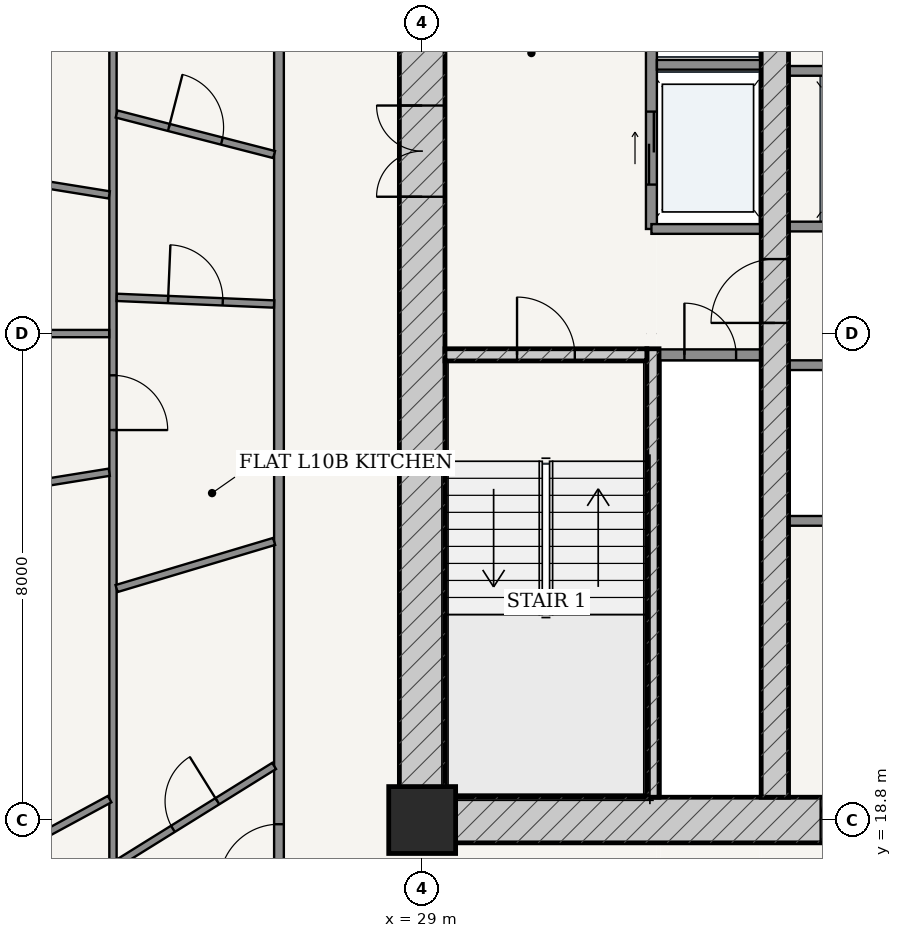
"""IFC4 building model, lengths in metres.
Left out: names, types, materials, properties, quantities, classifications, styles, units other than length and angle.
Written with IfcOpenShell. Run it as: python <this file> out.ifc"""

import sys

from ifc_helpers import new_model, si_unit, direction, frame, frame_2d, origin, origin_2d, place, context, subcontext, project, spatial, rectangle, extrude, source, transform, mapped, element, fill, save


model = new_model("IFC4")
c1 = context("Model", 3, precision=1e-05, world=origin(), true_north=direction((-0.2419218956, 0.970295726276)))
c2 = subcontext(c1, "Body", "Model", "MODEL_VIEW")
j1 = project(units=[si_unit("LENGTHUNIT", "METRE"), si_unit("PLANEANGLEUNIT", "RADIAN")], contexts=[c1])
p1 = place(None, origin())
s1 = spatial("IfcSite", under=j1, at=p1, CompositionType="ELEMENT")
p2 = place(p1, origin())
s2 = spatial("IfcBuilding", under=s1, at=p2, CompositionType="ELEMENT")
p3 = place(p2, frame((0.0, 0.0, 42.0)))
s3 = spatial("IfcBuildingStorey", under=s2, at=p3, CompositionType="ELEMENT", Elevation=42.0)
p4 = place(p3, frame((29.0, 18.8, 0.0), z_axis=(0.0, 0.0, 1.0), x_axis=(1.0, 0.0, 0.0)))
e1 = element("IfcColumn", 1, at=p4, inside=s3, PredefinedType="COLUMN", context=c2, shape_type="SweptSolid", body=[
    extrude(rectangle(XDim=1.1, YDim=1.1, at=origin_2d()), origin(), (0.0, 0.0, 1.0), 3.6),
])
p5 = place(p3, frame((28.625, 18.8, 0.0), z_axis=(0.0, 0.0, 1.0), x_axis=(1.0, 0.0, 0.0)))
e2 = element("IfcWall", 2, at=p5, inside=s3, PredefinedType="SHEAR", context=c2, shape_type="SweptSolid", body=[
    extrude(rectangle(XDim=18.75, YDim=0.75, at=frame_2d((9.375, 0.0))), origin(), (0.0, 0.0, 1.0), 3.32),
])
p6 = place(p5, frame((6.927, 0.0, 0.0)))
e3 = element("IfcOpeningElement", 3, at=p6, cuts=e2, PredefinedType="OPENING", context=c2, shape_type="SweptSolid", body=[
    extrude(rectangle(XDim=0.85, YDim=2.1, at=frame_2d((0.425, 1.05))), frame((0.0, 0.385, 0.0), z_axis=(0.0, -1.0, 0.0), x_axis=(1.0, 0.0, 0.0)), (0.0, 0.0, 1.0), 0.77),
])
p7 = place(p5, frame((8.95, 0.0, 0.0)))
e4 = element("IfcOpeningElement", 4, at=p7, cuts=e2, PredefinedType="OPENING", context=c2, shape_type="SweptSolid", body=[
    extrude(rectangle(XDim=0.85, YDim=2.1, at=frame_2d((0.425, 1.05))), frame((0.0, 0.385, 0.0), z_axis=(0.0, -1.0, 0.0), x_axis=(1.0, 0.0, 0.0)), (0.0, 0.0, 1.0), 0.77),
])
p8 = place(p5, frame((10.972, 0.0, 0.0)))
e5 = element("IfcOpeningElement", 5, at=p8, cuts=e2, PredefinedType="OPENING", context=c2, shape_type="SweptSolid", body=[
    extrude(rectangle(XDim=0.85, YDim=2.1, at=frame_2d((0.425, 1.05))), frame((0.0, 0.385, 0.0), z_axis=(0.0, -1.0, 0.0), x_axis=(1.0, 0.0, 0.0)), (0.0, 0.0, 1.0), 0.77),
])
p9 = place(p3, frame((29.0, 19.175, 0.0), z_axis=(0.0, 0.0, 1.0), x_axis=(0.0, 1.0, 0.0)))
e6 = element("IfcWall", 6, at=p9, inside=s3, PredefinedType="SHEAR", context=c2, shape_type="SweptSolid", body=[
    extrude(rectangle(XDim=15.25, YDim=0.75, at=frame_2d((7.625, 0.0))), origin(), (0.0, 0.0, 1.0), 3.32),
])
p10 = place(p9, frame((9.875, 0.0, 0.0)))
e7 = element("IfcOpeningElement", 7, at=p10, cuts=e6, PredefinedType="OPENING", context=c2, shape_type="SweptSolid", body=[
    extrude(rectangle(XDim=1.5, YDim=2.2, at=frame_2d((0.75, 1.1))), frame((0.0, 0.385, 0.0), z_axis=(0.0, -1.0, 0.0), x_axis=(1.0, 0.0, 0.0)), (0.0, 0.0, 1.0), 0.77),
])
p11 = place(p3, frame((32.795, 19.175, 0.0), z_axis=(0.0, 0.0, 1.0), x_axis=(0.0, 1.0, 0.0)))
e8 = element("IfcWall", 8, at=p11, inside=s3, PredefinedType="SOLIDWALL", context=c2, shape_type="SweptSolid", body=[
    extrude(rectangle(XDim=7.375, YDim=0.2, at=frame_2d((3.688, 0.0))), origin(), (0.0, 0.0, 1.0), 3.32),
])
p12 = place(p3, frame((29.375, 26.45, 0.0), z_axis=(0.0, 0.0, 1.0), x_axis=(1.0, 0.0, 0.0)))
e9 = element("IfcWall", 9, at=p12, inside=s3, PredefinedType="SOLIDWALL", context=c2, shape_type="SweptSolid", body=[
    extrude(rectangle(XDim=3.32, YDim=0.2, at=frame_2d((1.66, 0.0))), origin(), (0.0, 0.0, 1.0), 3.32),
])
p13 = place(p12, frame((1.185, 0.0, 0.0)))
e10 = element("IfcOpeningElement", 10, at=p13, cuts=e9, PredefinedType="OPENING", context=c2, shape_type="SweptSolid", body=[
    extrude(rectangle(XDim=0.95, YDim=2.15, at=frame_2d((0.475, 1.075))), frame((0.0, 0.11, 0.0), z_axis=(0.0, -1.0, 0.0), x_axis=(1.0, 0.0, 0.0)), (0.0, 0.0, 1.0), 0.22),
])
p14 = place(p3, frame((34.8, 19.175, 0.0), z_axis=(0.0, 0.0, 1.0), x_axis=(0.0, 1.0, 0.0)))
e11 = element("IfcWall", 11, at=p14, inside=s3, PredefinedType="SHEAR", context=c2, shape_type="SweptSolid", body=[
    extrude(rectangle(XDim=15.25, YDim=0.45, at=frame_2d((7.625, 0.0))), origin(), (0.0, 0.0, 1.0), 3.32),
])
p15 = place(p14, frame((7.8, 0.0, 0.0)))
e12 = element("IfcOpeningElement", 12, at=p15, cuts=e11, PredefinedType="OPENING", context=c2, shape_type="SweptSolid", body=[
    extrude(rectangle(XDim=1.05, YDim=2.15, at=frame_2d((0.525, 1.075))), frame((0.0, 0.235, 0.0), z_axis=(0.0, -1.0, 0.0), x_axis=(1.0, 0.0, 0.0)), (0.0, 0.0, 1.0), 0.47),
])
p16 = place(p3, frame((32.9, 26.45, 0.0), z_axis=(0.0, 0.0, 1.0), x_axis=(1.0, 0.0, 0.0)))
e13 = element("IfcWall", 13, at=p16, inside=s3, PredefinedType="PARTITIONING", context=c2, shape_type="SweptSolid", body=[
    extrude(rectangle(XDim=1.675, YDim=0.18, at=frame_2d((0.837, 0.0))), origin(), (0.0, 0.0, 1.0), 3.32),
])
p17 = place(p16, frame((0.413, 0.0, 0.0)))
e14 = element("IfcOpeningElement", 14, at=p17, cuts=e13, PredefinedType="OPENING", context=c2, shape_type="SweptSolid", body=[
    extrude(rectangle(XDim=0.85, YDim=2.1, at=frame_2d((0.425, 1.05))), frame((0.0, 0.1, 0.0), z_axis=(0.0, -1.0, 0.0), x_axis=(1.0, 0.0, 0.0)), (0.0, 0.0, 1.0), 0.2),
])
p18 = place(p3, frame((32.77, 28.52, 0.0), z_axis=(0.0, 0.0, 1.0), x_axis=(0.0, 1.0, 0.0)))
e15 = element("IfcWall", 15, at=p18, inside=s3, PredefinedType="PARTITIONING", context=c2, shape_type="SweptSolid", body=[
    extrude(rectangle(XDim=5.905, YDim=0.18, at=frame_2d((2.953, 0.0))), origin(), (0.0, 0.0, 1.0), 3.32),
])
p19 = place(p18, frame((3.655, 0.0, 0.0)))
e16 = element("IfcOpeningElement", 16, at=p19, cuts=e15, PredefinedType="OPENING", context=c2, shape_type="SweptSolid", body=[
    extrude(rectangle(XDim=1.15, YDim=2.2, at=frame_2d((0.575, 1.1))), frame((0.0, 0.1, 0.0), z_axis=(0.0, -1.0, 0.0), x_axis=(1.0, 0.0, 0.0)), (0.0, 0.0, 1.0), 0.2),
])
p20 = place(p18, frame((0.73, 0.0, 0.0)))
e17 = element("IfcOpeningElement", 17, at=p20, cuts=e15, PredefinedType="OPENING", context=c2, shape_type="SweptSolid", body=[
    extrude(rectangle(XDim=1.2, YDim=2.25, at=frame_2d((0.6, 1.125))), frame((0.0, 0.1, 0.0), z_axis=(0.0, -1.0, 0.0), x_axis=(1.0, 0.0, 0.0)), (0.0, 0.0, 1.0), 0.2),
])
p21 = place(p3, frame((32.86, 31.22, 0.0), z_axis=(0.0, 0.0, 1.0), x_axis=(1.0, 0.0, 0.0)))
e18 = element("IfcWall", 18, at=p21, inside=s3, PredefinedType="PARTITIONING", context=c2, shape_type="SweptSolid", body=[
    extrude(rectangle(XDim=1.715, YDim=0.16, at=frame_2d((0.857, 0.0))), origin(), (0.0, 0.0, 1.0), 3.32),
])
p22 = place(p3, frame((32.77, 28.52, 0.0), z_axis=(0.0, 0.0, 1.0), x_axis=(1.0, 0.0, 0.0)))
e19 = element("IfcWall", 19, at=p22, inside=s3, PredefinedType="PARTITIONING", context=c2, shape_type="SweptSolid", body=[
    extrude(rectangle(XDim=1.805, YDim=0.16, at=frame_2d((0.902, 0.0))), origin(), (0.0, 0.0, 1.0), 3.32),
])
p23 = place(p3, frame((35.025, 28.56, 0.0), z_axis=(0.0, 0.0, 1.0), x_axis=(1.0, 0.0, 0.0)))
e20 = element("IfcWall", 20, at=p23, inside=s3, PredefinedType="PARTITIONING", context=c2, shape_type="SweptSolid", body=[
    extrude(rectangle(XDim=5.95, YDim=0.16, at=frame_2d((2.975, 0.0))), origin(), (0.0, 0.0, 1.0), 3.32),
])
p24 = place(p23, frame((0.76, 0.0, 0.0)))
e21 = element("IfcOpeningElement", 21, at=p24, cuts=e20, PredefinedType="OPENING", context=c2, shape_type="SweptSolid", body=[
    extrude(rectangle(XDim=1.1, YDim=2.2, at=frame_2d((0.55, 1.1))), frame((0.0, 0.09, 0.0), z_axis=(0.0, -1.0, 0.0), x_axis=(1.0, 0.0, 0.0)), (0.0, 0.0, 1.0), 0.18),
])
p25 = place(p23, frame((2.425, 0.0, 0.0)))
e22 = element("IfcOpeningElement", 22, at=p25, cuts=e20, PredefinedType="OPENING", context=c2, shape_type="SweptSolid", body=[
    extrude(rectangle(XDim=1.1, YDim=2.2, at=frame_2d((0.55, 1.1))), frame((0.0, 0.09, 0.0), z_axis=(0.0, -1.0, 0.0), x_axis=(1.0, 0.0, 0.0)), (0.0, 0.0, 1.0), 0.18),
])
p26 = place(p23, frame((4.09, 0.0, 0.0)))
e23 = element("IfcOpeningElement", 23, at=p26, cuts=e20, PredefinedType="OPENING", context=c2, shape_type="SweptSolid", body=[
    extrude(rectangle(XDim=1.1, YDim=2.2, at=frame_2d((0.55, 1.1))), frame((0.0, 0.09, 0.0), z_axis=(0.0, -1.0, 0.0), x_axis=(1.0, 0.0, 0.0)), (0.0, 0.0, 1.0), 0.18),
])
for number, where, z_axis, x_axis in (
    (24, (35.025, 31.12, 0.0), (0.0, 0.0, 1.0), (1.0, 0.0, 0.0)),
    (25, (35.025, 26.28, 0.0), (0.0, 0.0, 1.0), (1.0, 0.0, 0.0)),
    (26, (35.025, 23.72, 0.0), (0.0, 0.0, 1.0), (1.0, 0.0, 0.0)),
):
    element("IfcWall", number, at=place(p3, frame(where, z_axis=z_axis, x_axis=x_axis)), inside=s3, PredefinedType="PARTITIONING", context=c2, shape_type="SweptSolid", body=[
        extrude(rectangle(XDim=5.95, YDim=0.16, at=frame_2d((2.975, 0.0))), origin(), (0.0, 0.0, 1.0), 3.32),
    ])
p27 = place(p3, frame((26.645, 16.525, 0.0), z_axis=(0.0, 0.0, 1.0), x_axis=(0.0, 1.0, 0.0)))
e27 = element("IfcWall", 27, at=p27, inside=s3, PredefinedType="PARTITIONING", context=c2, shape_type="SweptSolid", body=[
    extrude(rectangle(XDim=20.55, YDim=0.16, at=frame_2d((10.275, 0.0))), origin(), (0.0, 0.0, 1.0), 2.688),
])
p28 = place(p27, frame((1.226, 0.0, 0.0)))
e28 = element("IfcOpeningElement", 28, at=p28, cuts=e27, PredefinedType="OPENING", context=c2, shape_type="SweptSolid", body=[
    extrude(rectangle(XDim=0.98, YDim=2.2, at=frame_2d((0.49, 1.1))), frame((0.0, 0.09, 0.0), z_axis=(0.0, -1.0, 0.0), x_axis=(1.0, 0.0, 0.0)), (0.0, 0.0, 1.0), 0.18),
])
p29 = place(p3, frame((23.915, 13.715, 0.0), z_axis=(0.0, 0.0, 1.0), x_axis=(0.0, 1.0, 0.0)))
e29 = element("IfcWall", 29, at=p29, inside=s3, PredefinedType="PARTITIONING", context=c2, shape_type="SweptSolid", body=[
    extrude(rectangle(XDim=26.17, YDim=0.12, at=frame_2d((13.085, 0.0))), origin(), (0.0, 0.0, 1.0), 2.688),
])
p30 = place(p29, frame((1.895, 0.0, 0.0)))
e30 = element("IfcOpeningElement", 30, at=p30, cuts=e29, PredefinedType="OPENING", context=c2, shape_type="SweptSolid", body=[
    extrude(rectangle(XDim=0.9, YDim=2.15, at=frame_2d((0.45, 1.075))), frame((0.0, 0.07, 0.0), z_axis=(0.0, -1.0, 0.0), x_axis=(1.0, 0.0, 0.0)), (0.0, 0.0, 1.0), 0.14),
])
p31 = place(p29, frame((11.498, 0.0, 0.0)))
e31 = element("IfcOpeningElement", 31, at=p31, cuts=e29, PredefinedType="OPENING", context=c2, shape_type="SweptSolid", body=[
    extrude(rectangle(XDim=0.9, YDim=2.15, at=frame_2d((0.45, 1.075))), frame((0.0, 0.07, 0.0), z_axis=(0.0, -1.0, 0.0), x_axis=(1.0, 0.0, 0.0)), (0.0, 0.0, 1.0), 0.14),
])
p32 = place(p29, frame((23.831, 0.0, 0.0)))
e32 = element("IfcOpeningElement", 32, at=p32, cuts=e29, PredefinedType="OPENING", context=c2, shape_type="SweptSolid", body=[
    extrude(rectangle(XDim=0.86, YDim=2.15, at=frame_2d((0.43, 1.075))), frame((0.0, 0.07, 0.0), z_axis=(0.0, -1.0, 0.0), x_axis=(1.0, 0.0, 0.0)), (0.0, 0.0, 1.0), 0.14),
])
p33 = place(p3, frame((23.854, 29.08, 0.0), z_axis=(0.0, 0.0, 1.0), x_axis=(-0.987255773689, 0.159141563768, 0.0)))
e33 = element("IfcWall", 33, at=p33, inside=s3, PredefinedType="PARTITIONING", context=c2, shape_type="SweptSolid", body=[
    extrude(rectangle(XDim=14.359, YDim=0.12, at=frame_2d((7.18, 0.0))), origin(), (0.0, 0.0, 1.0), 2.688),
])
p34 = place(p33, frame((5.66, 0.0, 0.0)))
e34 = element("IfcOpeningElement", 34, at=p34, cuts=e33, PredefinedType="OPENING", context=c2, shape_type="SweptSolid", body=[
    extrude(rectangle(XDim=0.9, YDim=2.15, at=frame_2d((0.45, 1.075))), frame((0.0, 0.07, 0.0), z_axis=(0.0, -1.0, 0.0), x_axis=(1.0, 0.0, 0.0)), (0.0, 0.0, 1.0), 0.14),
])
p35 = place(p3, frame((23.853, 26.8, 0.0), z_axis=(0.0, 0.0, 1.0), x_axis=(-1.0, 0.0, 0.0)))
e35 = element("IfcWall", 35, at=p35, inside=s3, PredefinedType="PARTITIONING", context=c2, shape_type="SweptSolid", body=[
    extrude(rectangle(XDim=14.793, YDim=0.12, at=frame_2d((7.396, 0.0))), origin(), (0.0, 0.0, 1.0), 2.762),
])
p36 = place(p35, frame((6.947, 0.0, 0.0)))
e36 = element("IfcOpeningElement", 36, at=p36, cuts=e35, PredefinedType="OPENING", context=c2, shape_type="SweptSolid", body=[
    extrude(rectangle(XDim=0.9, YDim=2.15, at=frame_2d((0.45, 1.075))), frame((0.0, 0.07, 0.0), z_axis=(0.0, -1.0, 0.0), x_axis=(1.0, 0.0, 0.0)), (0.0, 0.0, 1.0), 0.14),
])
p37 = place(p3, frame((23.854, 24.52, 0.0), z_axis=(0.0, 0.0, 1.0), x_axis=(-0.987258444847, -0.159124991997, 0.0)))
e37 = element("IfcWall", 37, at=p37, inside=s3, PredefinedType="PARTITIONING", context=c2, shape_type="SweptSolid", body=[
    extrude(rectangle(XDim=14.359, YDim=0.12, at=frame_2d((7.18, 0.0))), origin(), (0.0, 0.0, 1.0), 2.688),
])
p38 = place(p37, frame((5.659, 0.0, 0.0)))
e38 = element("IfcOpeningElement", 38, at=p38, cuts=e37, PredefinedType="OPENING", context=c2, shape_type="SweptSolid", body=[
    extrude(rectangle(XDim=0.9, YDim=2.15, at=frame_2d((0.45, 1.075))), frame((0.0, 0.07, 0.0), z_axis=(0.0, -1.0, 0.0), x_axis=(1.0, 0.0, 0.0)), (0.0, 0.0, 1.0), 0.14),
])
p39 = place(p3, frame((23.861, 19.144, 0.0), z_axis=(0.0, 0.0, 1.0), x_axis=(-0.879372452045, -0.476134529922, 0.0)))
e39 = element("IfcWall", 39, at=p39, inside=s3, PredefinedType="PARTITIONING", context=c2, shape_type="SweptSolid", body=[
    extrude(rectangle(XDim=11.219, YDim=0.12, at=frame_2d((5.61, 0.0))), origin(), (0.0, 0.0, 1.0), 2.688),
])
p40 = place(p39, frame((4.097, 0.0, 0.0)))
e40 = element("IfcOpeningElement", 40, at=p40, cuts=e39, PredefinedType="OPENING", context=c2, shape_type="SweptSolid", body=[
    extrude(rectangle(XDim=0.9, YDim=2.15, at=frame_2d((0.45, 1.075))), frame((0.0, 0.07, 0.0), z_axis=(0.0, -1.0, 0.0), x_axis=(1.0, 0.0, 0.0)), (0.0, 0.0, 1.0), 0.14),
])
p41 = place(p3, frame((26.565, 29.744, 0.0), z_axis=(0.0, 0.0, 1.0), x_axis=(-0.968421803088, 0.249317490972, 0.0)))
e41 = element("IfcWall", 41, at=p41, inside=s3, PredefinedType="PARTITIONING", context=c2, shape_type="SweptSolid", body=[
    extrude(rectangle(XDim=2.674, YDim=0.12, at=frame_2d((1.337, 0.0))), origin(), (0.0, 0.0, 1.0), 3.32),
])
p42 = place(p41, frame((0.887, 0.0, 0.0)))
e42 = element("IfcOpeningElement", 42, at=p42, cuts=e41, PredefinedType="OPENING", context=c2, shape_type="SweptSolid", body=[
    extrude(rectangle(XDim=0.9, YDim=2.15, at=frame_2d((0.45, 1.075))), frame((0.0, 0.07, 0.0), z_axis=(0.0, -1.0, 0.0), x_axis=(1.0, 0.0, 0.0)), (0.0, 0.0, 1.0), 0.14),
])
p43 = place(p3, frame((26.565, 27.286, 0.0), z_axis=(0.0, 0.0, 1.0), x_axis=(-0.999100094808, 0.042414626666, 0.0)))
e43 = element("IfcWall", 43, at=p43, inside=s3, PredefinedType="PARTITIONING", context=c2, shape_type="SweptSolid", body=[
    extrude(rectangle(XDim=2.59, YDim=0.12, at=frame_2d((1.295, 0.0))), origin(), (0.0, 0.0, 1.0), 3.32),
])
p44 = place(p43, frame((0.845, 0.0, 0.0)))
e44 = element("IfcOpeningElement", 44, at=p44, cuts=e43, PredefinedType="OPENING", context=c2, shape_type="SweptSolid", body=[
    extrude(rectangle(XDim=0.9, YDim=2.15, at=frame_2d((0.45, 1.075))), frame((0.0, 0.07, 0.0), z_axis=(0.0, -1.0, 0.0), x_axis=(1.0, 0.0, 0.0)), (0.0, 0.0, 1.0), 0.14),
])
p45 = place(p3, frame((26.565, 23.382, 0.0), z_axis=(0.0, 0.0, 1.0), x_axis=(-0.958081868855, -0.286494559408, 0.0)))
e45 = element("IfcWall", 45, at=p45, inside=s3, PredefinedType="PARTITIONING", context=c2, shape_type="SweptSolid", body=[
    extrude(rectangle(XDim=2.704, YDim=0.12, at=frame_2d((1.352, 0.0))), origin(), (0.0, 0.0, 1.0), 3.32),
])
p46 = place(p3, frame((26.565, 19.69, 0.0), z_axis=(0.0, 0.0, 1.0), x_axis=(-0.849229217796, -0.52802437031, 0.0)))
e46 = element("IfcWall", 46, at=p46, inside=s3, PredefinedType="PARTITIONING", context=c2, shape_type="SweptSolid", body=[
    extrude(rectangle(XDim=3.059, YDim=0.12, at=frame_2d((1.529, 0.0))), origin(), (0.0, 0.0, 1.0), 3.32),
])
p47 = place(p46, frame((1.099, 0.0, 0.0)))
e47 = element("IfcOpeningElement", 47, at=p47, cuts=e46, PredefinedType="OPENING", context=c2, shape_type="SweptSolid", body=[
    extrude(rectangle(XDim=0.86, YDim=2.15, at=frame_2d((0.43, 1.075))), frame((0.0, 0.07, 0.0), z_axis=(0.0, -1.0, 0.0), x_axis=(1.0, 0.0, 0.0)), (0.0, 0.0, 1.0), 0.14),
])
m1 = source(origin(), c2, "Body", "SweptSolid", [
    extrude(rectangle(XDim=1.5, YDim=2.2, at=frame_2d((0.75, 1.1))), frame((0.0, 0.025, 0.0), z_axis=(0.0, -1.0, 0.0), x_axis=(1.0, 0.0, 0.0)), (0.0, 0.0, 1.0), 0.05),
])
p48 = place(p10, origin())
e48 = element("IfcDoor", 48, at=p48, inside=s3, OperationType="DOUBLE_DOOR_SINGLE_SWING", PredefinedType="DOOR", context=c2, shape_type="MappedRepresentation", body=[
    mapped(m1, transform((0.0, 0.0, 0.0), scale=1.0)),
])
fill(e7, e48)
m2 = source(origin(), c2, "Body", "SweptSolid", [
    extrude(rectangle(XDim=1.05, YDim=2.15, at=frame_2d((0.525, 1.075))), frame((0.0, 0.025, 0.0), z_axis=(0.0, -1.0, 0.0), x_axis=(1.0, 0.0, 0.0)), (0.0, 0.0, 1.0), 0.05),
])
p49 = place(p15, origin())
e49 = element("IfcDoor", 49, at=p49, inside=s3, OperationType="SINGLE_SWING_LEFT", PredefinedType="DOOR", context=c2, shape_type="MappedRepresentation", body=[
    mapped(m2, transform((0.0, 0.0, 0.0), scale=1.0)),
])
fill(e12, e49)
m3 = source(origin(), c2, "Body", "SweptSolid", [
    extrude(rectangle(XDim=0.95, YDim=2.15, at=frame_2d((0.475, 1.075))), frame((0.0, 0.025, 0.0), z_axis=(0.0, -1.0, 0.0), x_axis=(1.0, 0.0, 0.0)), (0.0, 0.0, 1.0), 0.05),
])
p50 = place(p13, origin())
e50 = element("IfcDoor", 50, at=p50, inside=s3, OperationType="SINGLE_SWING_LEFT", PredefinedType="DOOR", context=c2, shape_type="MappedRepresentation", body=[
    mapped(m3, transform((0.0, 0.0, 0.0), scale=1.0)),
])
fill(e10, e50)
m4 = source(origin(), c2, "Body", "SweptSolid", [
    extrude(rectangle(XDim=0.85, YDim=2.1, at=frame_2d((0.425, 1.05))), frame((0.0, 0.025, 0.0), z_axis=(0.0, -1.0, 0.0), x_axis=(1.0, 0.0, 0.0)), (0.0, 0.0, 1.0), 0.05),
])
p51 = place(p17, origin())
e51 = element("IfcDoor", 51, at=p51, inside=s3, OperationType="SINGLE_SWING_LEFT", PredefinedType="DOOR", context=c2, shape_type="MappedRepresentation", body=[
    mapped(m4, transform((0.0, 0.0, 0.0), scale=1.0)),
])
fill(e14, e51)
p52 = place(p6, origin())
e52 = element("IfcDoor", 52, at=p52, inside=s3, OperationType="SINGLE_SWING_RIGHT", PredefinedType="DOOR", context=c2, shape_type="MappedRepresentation", body=[
    mapped(m4, transform((0.0, 0.0, 0.0), scale=1.0)),
])
fill(e3, e52)
m5 = source(origin(), c2, "Body", "SweptSolid", [
    extrude(rectangle(XDim=1.2, YDim=2.25, at=frame_2d((0.6, 1.125))), frame((0.0, 0.025, 0.0), z_axis=(0.0, -1.0, 0.0), x_axis=(1.0, 0.0, 0.0)), (0.0, 0.0, 1.0), 0.05),
])
p53 = place(p20, origin())
e53 = element("IfcDoor", 53, at=p53, inside=s3, OperationType="DOUBLE_DOOR_SLIDING", PredefinedType="DOOR", context=c2, shape_type="MappedRepresentation", body=[
    mapped(m5, transform((0.0, 0.0, 0.0), scale=1.0)),
])
fill(e17, e53)
m6 = source(origin(), c2, "Body", "SweptSolid", [
    extrude(rectangle(XDim=0.98, YDim=2.2, at=frame_2d((0.49, 1.1))), frame((0.0, 0.025, 0.0), z_axis=(0.0, -1.0, 0.0), x_axis=(1.0, 0.0, 0.0)), (0.0, 0.0, 1.0), 0.05),
])
p54 = place(p28, origin())
e54 = element("IfcDoor", 54, at=p54, inside=s3, OperationType="SINGLE_SWING_LEFT", PredefinedType="DOOR", context=c2, shape_type="MappedRepresentation", body=[
    mapped(m6, transform((0.0, 0.0, 0.0), scale=1.0)),
])
fill(e28, e54)
m7 = source(origin(), c2, "Body", "SweptSolid", [
    extrude(rectangle(XDim=0.86, YDim=2.15, at=frame_2d((0.43, 1.075))), frame((0.0, 0.025, 0.0), z_axis=(0.0, -1.0, 0.0), x_axis=(1.0, 0.0, 0.0)), (0.0, 0.0, 1.0), 0.05),
])
p55 = place(p47, frame((0.86, 0.0, 0.0), z_axis=(0.0, 0.0, 1.0), x_axis=(-1.0, 0.0, 0.0)))
e55 = element("IfcDoor", 55, at=p55, inside=s3, OperationType="SINGLE_SWING_RIGHT", PredefinedType="DOOR", context=c2, shape_type="MappedRepresentation", body=[
    mapped(m7, transform((0.0, 0.0, 0.0), scale=1.0)),
])
fill(e47, e55)
m8 = source(origin(), c2, "Body", "SweptSolid", [
    extrude(rectangle(XDim=0.9, YDim=2.15, at=frame_2d((0.45, 1.075))), frame((0.0, 0.025, 0.0), z_axis=(0.0, -1.0, 0.0), x_axis=(1.0, 0.0, 0.0)), (0.0, 0.0, 1.0), 0.05),
])
p56 = place(p31, frame((0.9, 0.0, 0.0), z_axis=(0.0, 0.0, 1.0), x_axis=(-1.0, 0.0, 0.0)))
e56 = element("IfcDoor", 56, at=p56, inside=s3, OperationType="SINGLE_SWING_RIGHT", PredefinedType="DOOR", context=c2, shape_type="MappedRepresentation", body=[
    mapped(m8, transform((0.0, 0.0, 0.0), scale=1.0)),
])
fill(e31, e56)
p57 = place(p44, frame((0.9, 0.0, 0.0), z_axis=(0.0, 0.0, 1.0), x_axis=(-1.0, 0.0, 0.0)))
e57 = element("IfcDoor", 57, at=p57, inside=s3, OperationType="SINGLE_SWING_LEFT", PredefinedType="DOOR", context=c2, shape_type="MappedRepresentation", body=[
    mapped(m8, transform((0.0, 0.0, 0.0), scale=1.0)),
])
fill(e44, e57)
p58 = place(p42, frame((0.9, 0.0, 0.0), z_axis=(0.0, 0.0, 1.0), x_axis=(-1.0, 0.0, 0.0)))
e58 = element("IfcDoor", 58, at=p58, inside=s3, OperationType="SINGLE_SWING_LEFT", PredefinedType="DOOR", context=c2, shape_type="MappedRepresentation", body=[
    mapped(m8, transform((0.0, 0.0, 0.0), scale=1.0)),
])
fill(e42, e58)
save(model, sys.argv[1])
